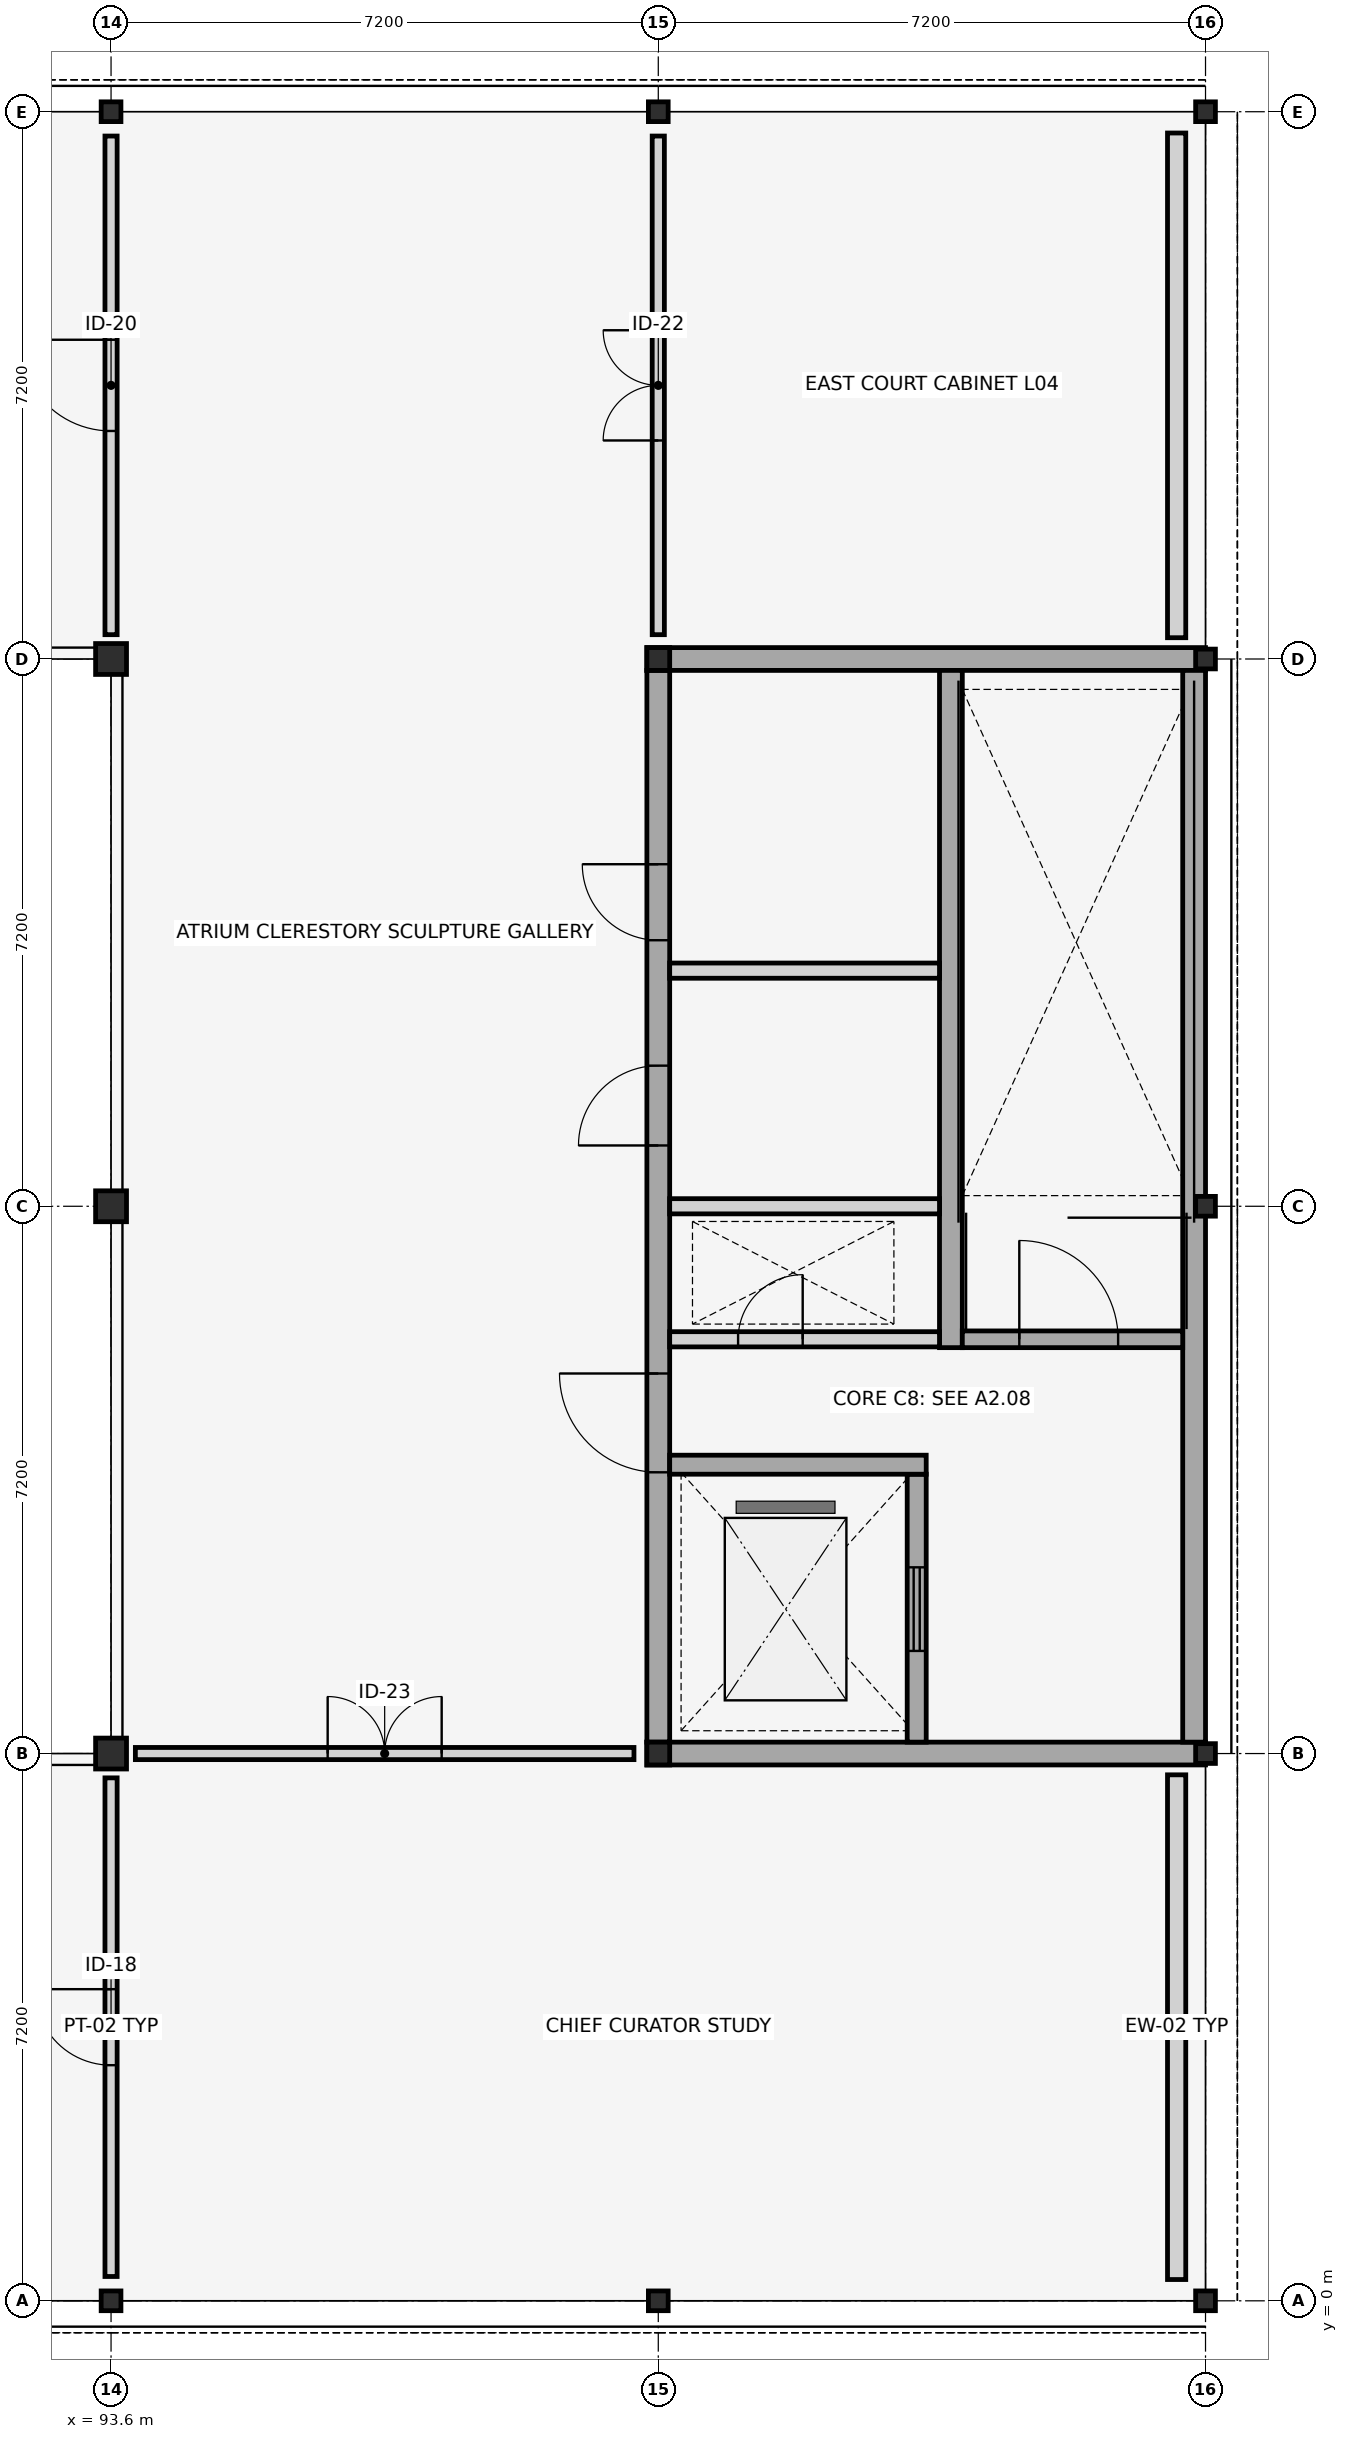
"""IFC4 building model, lengths in metres.
Left out: names, types, materials, properties, quantities, classifications, styles, units other than length and angle.
Written with IfcOpenShell. Run it as: python <this file> out.ifc"""

import sys

from ifc_helpers import new_model, si_unit, direction, frame, frame_2d, origin, origin_2d, place, context, subcontext, project, spatial, rectangle, hollow_circle, i_section, extrude, element, fill, save


model = new_model("IFC4")
c1 = context("Model", 3, precision=1e-05, world=origin(), true_north=direction((0.0, 1.0)))
c2 = subcontext(c1, "Body", "Model", "MODEL_VIEW")
j1 = project(units=[si_unit("LENGTHUNIT", "METRE"), si_unit("PLANEANGLEUNIT", "RADIAN")], contexts=[c1])
p1 = place(None, origin())
s1 = spatial("IfcSite", under=j1, at=p1, CompositionType="ELEMENT")
p2 = place(p1, origin())
s2 = spatial("IfcBuilding", under=s1, at=p2, CompositionType="ELEMENT")
p3 = place(p2, frame((0.0, 0.0, 17.1)))
s3 = spatial("IfcBuildingStorey", under=s2, at=p3, CompositionType="ELEMENT", Elevation=17.1)
p4 = place(p3, frame((93.6, 0.0, 0.0), z_axis=(0.0, 0.0, 1.0), x_axis=(0.0, 1.0, 0.0)))
e1 = element("IfcColumn", 1, at=p4, inside=s3, PredefinedType="COLUMN", context=c2, shape_type="SweptSolid", body=[
    extrude(i_section(OverallWidth=0.26, OverallDepth=0.26, WebThickness=0.01, FlangeThickness=0.018, FilletRadius=0.024, at=origin_2d()), origin(), (0.0, 0.0, 1.0), 8.1),
])
for number, where, z_axis, x_axis in (
    (2, (93.6, 7.2, 0.0), (0.0, 0.0, 1.0), (1.0, 0.0, 0.0)),
    (3, (93.6, 14.4, 0.0), (0.0, 0.0, 1.0), (0.0, 1.0, 0.0)),
    (4, (93.6, 21.6, 0.0), (0.0, 0.0, 1.0), (1.0, 0.0, 0.0)),
):
    element("IfcColumn", number, at=place(p3, frame(where, z_axis=z_axis, x_axis=x_axis)), inside=s3, PredefinedType="COLUMN", context=c2, shape_type="SweptSolid", body=[
        extrude(hollow_circle(Radius=0.203, WallThickness=0.016, at=origin_2d()), origin(), (0.0, 0.0, 1.0), 8.1),
    ])
for number, where, z_axis, x_axis in (
    (5, (93.6, 28.8, 0.0), (0.0, 0.0, 1.0), (0.0, 1.0, 0.0)),
    (6, (100.8, 0.0, 0.0), (0.0, 0.0, 1.0), (1.0, 0.0, 0.0)),
):
    element("IfcColumn", number, at=place(p3, frame(where, z_axis=z_axis, x_axis=x_axis)), inside=s3, PredefinedType="COLUMN", context=c2, shape_type="SweptSolid", body=[
        extrude(i_section(OverallWidth=0.26, OverallDepth=0.26, WebThickness=0.01, FlangeThickness=0.018, FilletRadius=0.024, at=origin_2d()), origin(), (0.0, 0.0, 1.0), 8.1),
    ])
for number, where, z_axis, x_axis in (
    (7, (100.8, 7.2, 0.0), (0.0, 0.0, 1.0), (0.0, 1.0, 0.0)),
    (8, (100.8, 21.6, 0.0), (0.0, 0.0, 1.0), (0.0, 1.0, 0.0)),
):
    element("IfcColumn", number, at=place(p3, frame(where, z_axis=z_axis, x_axis=x_axis)), inside=s3, PredefinedType="COLUMN", context=c2, shape_type="SweptSolid", body=[
        extrude(i_section(OverallWidth=0.3, OverallDepth=0.3, WebThickness=0.011, FlangeThickness=0.019, FilletRadius=0.027, at=origin_2d()), origin(), (0.0, 0.0, 1.0), 8.1),
    ])
for number, where, z_axis, x_axis in (
    (9, (100.8, 28.8, 0.0), (0.0, 0.0, 1.0), (1.0, 0.0, 0.0)),
    (10, (108.0, 0.0, 0.0), (0.0, 0.0, 1.0), (0.0, 1.0, 0.0)),
    (11, (108.0, 7.2, 0.0), (0.0, 0.0, 1.0), (1.0, 0.0, 0.0)),
    (12, (108.0, 14.4, 0.0), (0.0, 0.0, 1.0), (0.0, 1.0, 0.0)),
    (13, (108.0, 21.6, 0.0), (0.0, 0.0, 1.0), (1.0, 0.0, 0.0)),
    (14, (108.0, 28.8, 0.0), (0.0, 0.0, 1.0), (0.0, 1.0, 0.0)),
):
    element("IfcColumn", number, at=place(p3, frame(where, z_axis=z_axis, x_axis=x_axis)), inside=s3, PredefinedType="COLUMN", context=c2, shape_type="SweptSolid", body=[
        extrude(i_section(OverallWidth=0.26, OverallDepth=0.26, WebThickness=0.01, FlangeThickness=0.018, FilletRadius=0.024, at=origin_2d()), origin(), (0.0, 0.0, 1.0), 8.1),
    ])
p5 = place(p3, frame((107.62, 0.28, 0.0), z_axis=(0.0, 0.0, 1.0), x_axis=(0.0, 1.0, 0.0)))
e15 = element("IfcWall", 15, at=p5, inside=s3, PredefinedType="STANDARD", context=c2, shape_type="SweptSolid", body=[
    extrude(rectangle(XDim=6.64, YDim=0.24, at=frame_2d((3.32, 0.0))), origin(), (0.0, 0.0, 1.0), 7.48),
])
p6 = place(p3, frame((107.62, 21.88, 0.0), z_axis=(0.0, 0.0, 1.0), x_axis=(0.0, 1.0, 0.0)))
e16 = element("IfcWall", 16, at=p6, inside=s3, PredefinedType="STANDARD", context=c2, shape_type="SweptSolid", body=[
    extrude(rectangle(XDim=6.64, YDim=0.24, at=frame_2d((3.32, 0.0))), origin(), (0.0, 0.0, 1.0), 7.48),
])
for number, where, z_axis, x_axis in (
    (17, (100.65, 7.2, 0.0), (0.0, 0.0, 1.0), (1.0, 0.0, 0.0)),
    (18, (100.65, 21.6, 0.0), (0.0, 0.0, 1.0), (1.0, 0.0, 0.0)),
):
    element("IfcWall", number, at=place(p3, frame(where, z_axis=z_axis, x_axis=x_axis)), inside=s3, PredefinedType="SHEAR", context=c2, shape_type="SweptSolid", body=[
        extrude(rectangle(XDim=7.35, YDim=0.3, at=frame_2d((3.675, 0.0))), origin(), (0.0, 0.0, 1.0), 7.88),
    ])
p7 = place(p3, frame((107.85, 7.35, 0.0), z_axis=(0.0, 0.0, 1.0), x_axis=(0.0, 1.0, 0.0)))
e19 = element("IfcWall", 19, at=p7, inside=s3, PredefinedType="SHEAR", context=c2, shape_type="SweptSolid", body=[
    extrude(rectangle(XDim=14.1, YDim=0.3, at=frame_2d((7.05, 0.0))), origin(), (0.0, 0.0, 1.0), 7.88),
])
p8 = place(p3, frame((100.8, 7.35, 0.0), z_axis=(0.0, 0.0, 1.0), x_axis=(0.0, 1.0, 0.0)))
e20 = element("IfcWall", 20, at=p8, inside=s3, PredefinedType="SHEAR", context=c2, shape_type="SweptSolid", body=[
    extrude(rectangle(XDim=14.1, YDim=0.3, at=frame_2d((7.05, 0.0))), origin(), (0.0, 0.0, 1.0), 7.88),
])
p9 = place(p8, frame((3.55, 0.0, 0.0)))
e21 = element("IfcOpeningElement", 21, at=p9, cuts=e20, PredefinedType="OPENING", context=c2, shape_type="SweptSolid", body=[
    extrude(rectangle(XDim=1.3, YDim=2.2, at=frame_2d((0.65, 1.1))), frame((0.0, 0.16, 0.0), z_axis=(0.0, -1.0, 0.0), x_axis=(1.0, 0.0, 0.0)), (0.0, 0.0, 1.0), 0.32),
])
p10 = place(p8, frame((7.85, 0.0, 0.0)))
e22 = element("IfcOpeningElement", 22, at=p10, cuts=e20, PredefinedType="OPENING", context=c2, shape_type="SweptSolid", body=[
    extrude(rectangle(XDim=1.05, YDim=2.15, at=frame_2d((0.525, 1.075))), frame((0.0, 0.16, 0.0), z_axis=(0.0, -1.0, 0.0), x_axis=(1.0, 0.0, 0.0)), (0.0, 0.0, 1.0), 0.32),
])
p11 = place(p8, frame((10.55, 0.0, 0.0)))
e23 = element("IfcOpeningElement", 23, at=p11, cuts=e20, PredefinedType="OPENING", context=c2, shape_type="SweptSolid", body=[
    extrude(rectangle(XDim=1.0, YDim=2.15, at=frame_2d((0.5, 1.075))), frame((0.0, 0.16, 0.0), z_axis=(0.0, -1.0, 0.0), x_axis=(1.0, 0.0, 0.0)), (0.0, 0.0, 1.0), 0.32),
])
p12 = place(p3, frame((104.2, 7.35, 0.0), z_axis=(0.0, 0.0, 1.0), x_axis=(0.0, 1.0, 0.0)))
e24 = element("IfcWall", 24, at=p12, inside=s3, PredefinedType="SHEAR", context=c2, shape_type="SweptSolid", body=[
    extrude(rectangle(XDim=3.525, YDim=0.25, at=frame_2d((1.762, 0.0))), origin(), (0.0, 0.0, 1.0), 7.88),
])
p13 = place(p12, frame((1.2, 0.0, 0.0)))
e25 = element("IfcOpeningElement", 25, at=p13, cuts=e24, PredefinedType="OPENING", context=c2, shape_type="SweptSolid", body=[
    extrude(rectangle(XDim=1.1, YDim=2.15, at=frame_2d((0.55, 1.075))), frame((0.0, 0.135, 0.0), z_axis=(0.0, -1.0, 0.0), x_axis=(1.0, 0.0, 0.0)), (0.0, 0.0, 1.0), 0.27),
])
p14 = place(p3, frame((104.65, 12.54, 0.0), z_axis=(0.0, 0.0, 1.0), x_axis=(0.0, 1.0, 0.0)))
e26 = element("IfcWall", 26, at=p14, inside=s3, PredefinedType="SHEAR", context=c2, shape_type="SweptSolid", body=[
    extrude(rectangle(XDim=8.91, YDim=0.3, at=frame_2d((4.455, 0.0))), origin(), (0.0, 0.0, 1.0), 7.88),
])
p15 = place(p3, frame((100.95, 12.65, 0.0), z_axis=(0.0, 0.0, 1.0), x_axis=(1.0, 0.0, 0.0)))
e27 = element("IfcWall", 27, at=p15, inside=s3, PredefinedType="PLUMBINGWALL", context=c2, shape_type="SweptSolid", body=[
    extrude(rectangle(XDim=3.55, YDim=0.2, at=frame_2d((1.775, 0.0))), origin(), (0.0, 0.0, 1.0), 7.3),
])
p16 = place(p15, frame((0.9, 0.0, 0.0)))
e28 = element("IfcOpeningElement", 28, at=p16, cuts=e27, PredefinedType="OPENING", context=c2, shape_type="SweptSolid", body=[
    extrude(rectangle(XDim=0.85, YDim=2.05, at=frame_2d((0.425, 1.025))), frame((0.0, 0.11, 0.0), z_axis=(0.0, -1.0, 0.0), x_axis=(1.0, 0.0, 0.0)), (0.0, 0.0, 1.0), 0.22),
])
p17 = place(p3, frame((104.8, 12.65, 0.0), z_axis=(0.0, 0.0, 1.0), x_axis=(1.0, 0.0, 0.0)))
e29 = element("IfcWall", 29, at=p17, inside=s3, PredefinedType="SHEAR", context=c2, shape_type="SweptSolid", body=[
    extrude(rectangle(XDim=2.9, YDim=0.22, at=frame_2d((1.45, 0.0))), origin(), (0.0, 0.0, 1.0), 7.88),
])
p18 = place(p17, frame((0.75, 0.0, 0.0)))
e30 = element("IfcOpeningElement", 30, at=p18, cuts=e29, PredefinedType="OPENING", context=c2, shape_type="SweptSolid", body=[
    extrude(rectangle(XDim=1.3, YDim=2.2, at=frame_2d((0.65, 1.1))), frame((0.0, 0.12, 0.0), z_axis=(0.0, -1.0, 0.0), x_axis=(1.0, 0.0, 0.0)), (0.0, 0.0, 1.0), 0.24),
])
p19 = place(p3, frame((100.95, 11.0, 0.0), z_axis=(0.0, 0.0, 1.0), x_axis=(1.0, 0.0, 0.0)))
e31 = element("IfcWall", 31, at=p19, inside=s3, PredefinedType="SHEAR", context=c2, shape_type="SweptSolid", body=[
    extrude(rectangle(XDim=3.375, YDim=0.25, at=frame_2d((1.688, 0.0))), origin(), (0.0, 0.0, 1.0), 7.88),
])
for number, where, z_axis, x_axis in (
    (32, (100.95, 14.4, 0.0), (0.0, 0.0, 1.0), (1.0, 0.0, 0.0)),
    (33, (100.95, 17.5, 0.0), (0.0, 0.0, 1.0), (1.0, 0.0, 0.0)),
):
    element("IfcWall", number, at=place(p3, frame(where, z_axis=z_axis, x_axis=x_axis)), inside=s3, PredefinedType="PLUMBINGWALL", context=c2, shape_type="SweptSolid", body=[
        extrude(rectangle(XDim=3.55, YDim=0.2, at=frame_2d((1.775, 0.0))), origin(), (0.0, 0.0, 1.0), 7.3),
    ])
p20 = place(p3, frame((93.6, 0.32, 0.0), z_axis=(0.0, 0.0, 1.0), x_axis=(0.0, 1.0, 0.0)))
e34 = element("IfcWall", 34, at=p20, inside=s3, PredefinedType="PARTITIONING", context=c2, shape_type="SweptSolid", body=[
    extrude(rectangle(XDim=6.56, YDim=0.16, at=frame_2d((3.28, 0.0))), origin(), (0.0, 0.0, 1.0), 7.05),
])
p21 = place(p20, frame((2.78, 0.0, 0.0)))
e35 = element("IfcOpeningElement", 35, at=p21, cuts=e34, PredefinedType="OPENING", context=c2, shape_type="SweptSolid", body=[
    extrude(rectangle(XDim=1.0, YDim=2.25, at=frame_2d((0.5, 1.125))), frame((0.0, 0.09, 0.0), z_axis=(0.0, -1.0, 0.0), x_axis=(1.0, 0.0, 0.0)), (0.0, 0.0, 1.0), 0.18),
])
p22 = place(p3, frame((93.6, 21.92, 0.0), z_axis=(0.0, 0.0, 1.0), x_axis=(0.0, 1.0, 0.0)))
e36 = element("IfcWall", 36, at=p22, inside=s3, PredefinedType="PARTITIONING", context=c2, shape_type="SweptSolid", body=[
    extrude(rectangle(XDim=6.56, YDim=0.16, at=frame_2d((3.28, 0.0))), origin(), (0.0, 0.0, 1.0), 7.05),
])
p23 = place(p22, frame((2.68, 0.0, 0.0)))
e37 = element("IfcOpeningElement", 37, at=p23, cuts=e36, PredefinedType="OPENING", context=c2, shape_type="SweptSolid", body=[
    extrude(rectangle(XDim=1.2, YDim=2.4, at=frame_2d((0.6, 1.2))), frame((0.0, 0.09, 0.0), z_axis=(0.0, -1.0, 0.0), x_axis=(1.0, 0.0, 0.0)), (0.0, 0.0, 1.0), 0.18),
])
p24 = place(p3, frame((100.8, 21.92, 0.0), z_axis=(0.0, 0.0, 1.0), x_axis=(0.0, 1.0, 0.0)))
e38 = element("IfcWall", 38, at=p24, inside=s3, PredefinedType="PARTITIONING", context=c2, shape_type="SweptSolid", body=[
    extrude(rectangle(XDim=6.56, YDim=0.16, at=frame_2d((3.28, 0.0))), origin(), (0.0, 0.0, 1.0), 7.05),
])
p25 = place(p24, frame((2.555, 0.0, 0.0)))
e39 = element("IfcOpeningElement", 39, at=p25, cuts=e38, PredefinedType="OPENING", context=c2, shape_type="SweptSolid", body=[
    extrude(rectangle(XDim=1.45, YDim=2.35, at=frame_2d((0.725, 1.175))), frame((0.0, 0.09, 0.0), z_axis=(0.0, -1.0, 0.0), x_axis=(1.0, 0.0, 0.0)), (0.0, 0.0, 1.0), 0.18),
])
p26 = place(p3, frame((93.92, 7.2, 0.0), z_axis=(0.0, 0.0, 1.0), x_axis=(1.0, 0.0, 0.0)))
e40 = element("IfcWall", 40, at=p26, inside=s3, PredefinedType="PARTITIONING", context=c2, shape_type="SweptSolid", body=[
    extrude(rectangle(XDim=6.56, YDim=0.16, at=frame_2d((3.28, 0.0))), origin(), (0.0, 0.0, 1.0), 7.05),
])
p27 = place(p26, frame((2.53, 0.0, 0.0)))
e41 = element("IfcOpeningElement", 41, at=p27, cuts=e40, PredefinedType="OPENING", context=c2, shape_type="SweptSolid", body=[
    extrude(rectangle(XDim=1.5, YDim=2.5, at=frame_2d((0.75, 1.25))), frame((0.0, 0.09, 0.0), z_axis=(0.0, -1.0, 0.0), x_axis=(1.0, 0.0, 0.0)), (0.0, 0.0, 1.0), 0.18),
])
p28 = place(p9, origin())
e42 = element("IfcDoor", 42, at=p28, inside=s3, OperationType="SINGLE_SWING_RIGHT", PredefinedType="DOOR", context=c2, shape_type="SweptSolid", body=[
    extrude(rectangle(XDim=1.3, YDim=2.2, at=frame_2d((0.65, 1.1))), frame((0.0, 0.025, 0.0), z_axis=(0.0, -1.0, 0.0), x_axis=(1.0, 0.0, 0.0)), (0.0, 0.0, 1.0), 0.05),
])
fill(e21, e42)
p29 = place(p10, origin())
e43 = element("IfcDoor", 43, at=p29, inside=s3, OperationType="SINGLE_SWING_LEFT", PredefinedType="DOOR", context=c2, shape_type="SweptSolid", body=[
    extrude(rectangle(XDim=1.05, YDim=2.15, at=frame_2d((0.525, 1.075))), frame((0.0, 0.025, 0.0), z_axis=(0.0, -1.0, 0.0), x_axis=(1.0, 0.0, 0.0)), (0.0, 0.0, 1.0), 0.05),
])
fill(e22, e43)
p30 = place(p11, origin())
e44 = element("IfcDoor", 44, at=p30, inside=s3, OperationType="SINGLE_SWING_RIGHT", PredefinedType="DOOR", context=c2, shape_type="SweptSolid", body=[
    extrude(rectangle(XDim=1.0, YDim=2.15, at=frame_2d((0.5, 1.075))), frame((0.0, 0.025, 0.0), z_axis=(0.0, -1.0, 0.0), x_axis=(1.0, 0.0, 0.0)), (0.0, 0.0, 1.0), 0.05),
])
fill(e23, e44)
p31 = place(p13, origin())
e45 = element("IfcDoor", 45, at=p31, inside=s3, OperationType="SLIDING_TO_LEFT", PredefinedType="DOOR", context=c2, shape_type="SweptSolid", body=[
    extrude(rectangle(XDim=1.1, YDim=2.15, at=frame_2d((0.55, 1.075))), frame((0.0, 0.025, 0.0), z_axis=(0.0, -1.0, 0.0), x_axis=(1.0, 0.0, 0.0)), (0.0, 0.0, 1.0), 0.05),
])
fill(e25, e45)
p32 = place(p16, origin())
e46 = element("IfcDoor", 46, at=p32, inside=s3, OperationType="SINGLE_SWING_RIGHT", PredefinedType="TRAPDOOR", context=c2, shape_type="SweptSolid", body=[
    extrude(rectangle(XDim=0.85, YDim=2.05, at=frame_2d((0.425, 1.025))), frame((0.0, 0.025, 0.0), z_axis=(0.0, -1.0, 0.0), x_axis=(1.0, 0.0, 0.0)), (0.0, 0.0, 1.0), 0.05),
])
fill(e28, e46)
p33 = place(p18, origin())
e47 = element("IfcDoor", 47, at=p33, inside=s3, OperationType="SINGLE_SWING_LEFT", PredefinedType="DOOR", context=c2, shape_type="SweptSolid", body=[
    extrude(rectangle(XDim=1.3, YDim=2.2, at=frame_2d((0.65, 1.1))), frame((0.0, 0.025, 0.0), z_axis=(0.0, -1.0, 0.0), x_axis=(1.0, 0.0, 0.0)), (0.0, 0.0, 1.0), 0.05),
])
fill(e30, e47)
p34 = place(p21, origin())
e48 = element("IfcDoor", 48, at=p34, inside=s3, OperationType="SINGLE_SWING_RIGHT", PredefinedType="DOOR", context=c2, shape_type="SweptSolid", body=[
    extrude(rectangle(XDim=1.0, YDim=2.25, at=frame_2d((0.5, 1.125))), frame((0.0, 0.025, 0.0), z_axis=(0.0, -1.0, 0.0), x_axis=(1.0, 0.0, 0.0)), (0.0, 0.0, 1.0), 0.05),
])
fill(e35, e48)
p35 = place(p23, origin())
e49 = element("IfcDoor", 49, at=p35, inside=s3, OperationType="SINGLE_SWING_RIGHT", PredefinedType="DOOR", context=c2, shape_type="SweptSolid", body=[
    extrude(rectangle(XDim=1.2, YDim=2.4, at=frame_2d((0.6, 1.2))), frame((0.0, 0.025, 0.0), z_axis=(0.0, -1.0, 0.0), x_axis=(1.0, 0.0, 0.0)), (0.0, 0.0, 1.0), 0.05),
])
fill(e37, e49)
p36 = place(p25, origin())
e50 = element("IfcDoor", 50, at=p36, inside=s3, OperationType="DOUBLE_DOOR_SINGLE_SWING", PredefinedType="DOOR", context=c2, shape_type="SweptSolid", body=[
    extrude(rectangle(XDim=1.45, YDim=2.35, at=frame_2d((0.725, 1.175))), frame((0.0, 0.025, 0.0), z_axis=(0.0, -1.0, 0.0), x_axis=(1.0, 0.0, 0.0)), (0.0, 0.0, 1.0), 0.05),
])
fill(e39, e50)
p37 = place(p27, origin())
e51 = element("IfcDoor", 51, at=p37, inside=s3, OperationType="DOUBLE_DOOR_SINGLE_SWING", PredefinedType="DOOR", context=c2, shape_type="SweptSolid", body=[
    extrude(rectangle(XDim=1.5, YDim=2.5, at=frame_2d((0.75, 1.25))), frame((0.0, 0.025, 0.0), z_axis=(0.0, -1.0, 0.0), x_axis=(1.0, 0.0, 0.0)), (0.0, 0.0, 1.0), 0.05),
])
fill(e41, e51)
save(model, sys.argv[1])
